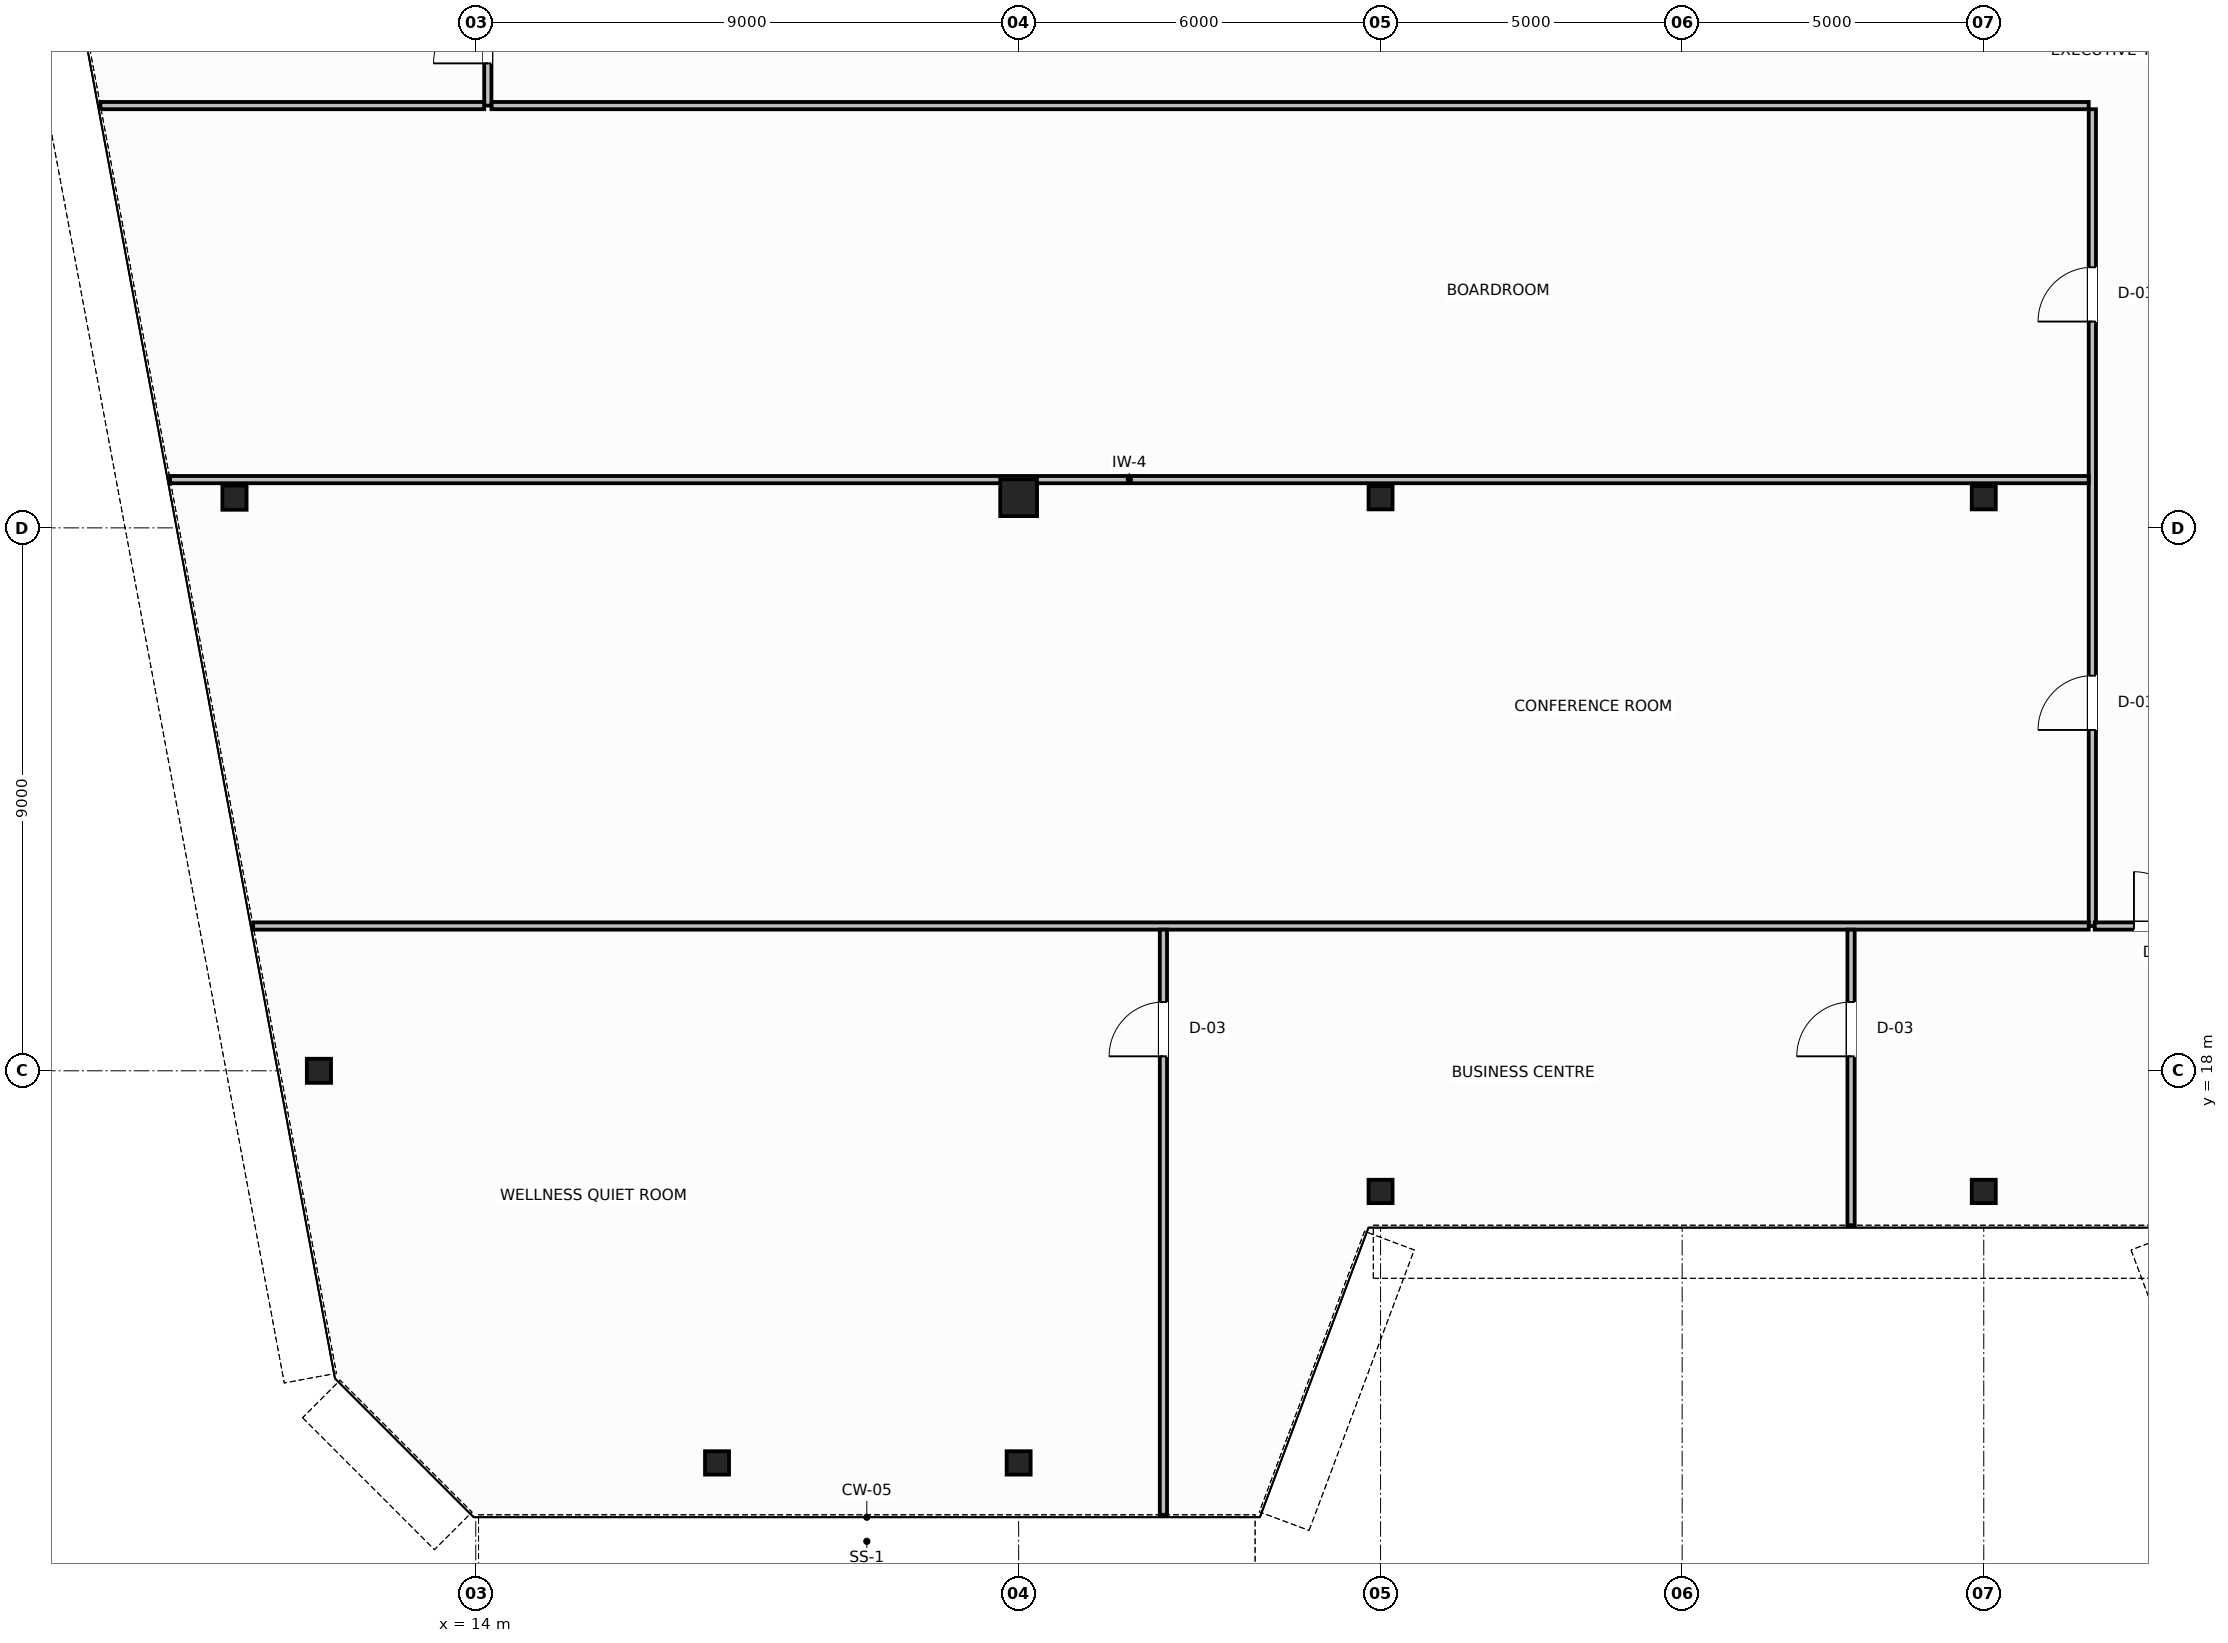
"""IFC4 building model, lengths in metres.
Left out: names, types, materials, properties, quantities, classifications, styles, units other than length and angle.
Written with IfcOpenShell. Run it as: python <this file> out.ifc"""

import sys

from ifc_helpers import new_model, si_unit, direction, frame, frame_2d, origin, origin_2d, place, context, subcontext, project, spatial, rectangle, hollow_circle, i_section, extrude, source, transform, mapped, element, fill, save


model = new_model("IFC4")
c1 = context("Model", 3, precision=1e-05, world=origin(), true_north=direction((0.0, 1.0)))
c2 = subcontext(c1, "Body", "Model", "MODEL_VIEW")
j1 = project(units=[si_unit("LENGTHUNIT", "METRE"), si_unit("PLANEANGLEUNIT", "RADIAN")], contexts=[c1])
p1 = place(None, origin())
s1 = spatial("IfcSite", under=j1, at=p1, CompositionType="ELEMENT")
p2 = place(p1, origin())
s2 = spatial("IfcBuilding", under=s1, at=p2, CompositionType="ELEMENT")
p3 = place(p2, frame((0.0, 0.0, 253.6)))
s3 = spatial("IfcBuildingStorey", under=s2, at=p3, CompositionType="ELEMENT", Elevation=253.6)
m1 = source(origin(), c2, "Body", "SweptSolid", [
    extrude(i_section(OverallWidth=0.401, OverallDepth=0.399, WebThickness=0.025, FlangeThickness=0.035, FilletRadius=0.015, at=origin_2d()), origin(), (0.0, 0.0, 1.0), 3.8),
])
for number, where, z_axis, x_axis in (
    (1, (10.0, 27.5, 0.0), (0.0, 0.0, 1.0), (1.0, 0.0, 0.0)),
    (2, (11.4, 18.0, 0.0), (0.0, 0.0, 1.0), (1.0, 0.0, 0.0)),
):
    element("IfcColumn", number, at=place(p3, frame(where, z_axis=z_axis, x_axis=x_axis)), inside=s3, PredefinedType="COLUMN", context=c2, shape_type="MappedRepresentation", body=[
        mapped(m1, transform((0.0, 0.0, 0.0), scale=1.0)),
    ])
m2 = source(origin(), c2, "Body", "SweptSolid", [
    extrude(hollow_circle(Radius=0.305, WallThickness=0.03, at=origin_2d()), origin(), (0.0, 0.0, 1.0), 3.8),
])
p4 = place(p3, frame((23.0, 27.5, 0.0), z_axis=(0.0, 0.0, 1.0), x_axis=(1.0, 0.0, 0.0)))
e3 = element("IfcColumn", 3, at=p4, inside=s3, PredefinedType="COLUMN", context=c2, shape_type="MappedRepresentation", body=[
    mapped(m2, transform((0.0, 0.0, 0.0), scale=1.0)),
])
m3 = source(origin(), c2, "Body", "SweptSolid", [
    extrude(i_section(OverallWidth=0.398, OverallDepth=0.387, WebThickness=0.021, FlangeThickness=0.029, FilletRadius=0.015, at=origin_2d()), origin(), (0.0, 0.0, 1.0), 3.8),
])
for number, where, z_axis, x_axis in (
    (4, (29.0, 27.5, 0.0), (0.0, 0.0, 1.0), (1.0, 0.0, 0.0)),
    (5, (39.0, 27.5, 0.0), (0.0, 0.0, 1.0), (1.0, 0.0, 0.0)),
    (6, (18.0, 11.5, 0.0), (0.0, 0.0, 1.0), (1.0, 0.0, 0.0)),
    (7, (23.0, 11.5, 0.0), (0.0, 0.0, 1.0), (1.0, 0.0, 0.0)),
    (8, (29.0, 16.0, 0.0), (0.0, 0.0, 1.0), (1.0, 0.0, 0.0)),
    (9, (39.0, 16.0, 0.0), (0.0, 0.0, 1.0), (1.0, 0.0, 0.0)),
):
    element("IfcColumn", number, at=place(p3, frame(where, z_axis=z_axis, x_axis=x_axis)), inside=s3, PredefinedType="COLUMN", context=c2, shape_type="MappedRepresentation", body=[
        mapped(m3, transform((0.0, 0.0, 0.0), scale=1.0)),
    ])
p5 = place(p3, frame((14.26, 34.0, 0.0), z_axis=(0.0, 0.0, 1.0), x_axis=(1.0, 0.0, 0.0)))
e10 = element("IfcWall", 10, at=p5, inside=s3, PredefinedType="PARTITIONING", context=c2, shape_type="SweptSolid", body=[
    extrude(rectangle(XDim=26.48, YDim=0.12, at=frame_2d((13.24, 0.0))), origin(), (0.0, 0.0, 1.0), 3.58),
])
p6 = place(p3, frame((14.2, 34.0, 0.0), z_axis=(0.0, 0.0, 1.0), x_axis=(0.0, 1.0, 0.0)))
e11 = element("IfcWall", 11, at=p6, inside=s3, PredefinedType="PARTITIONING", context=c2, shape_type="SweptSolid", body=[
    extrude(rectangle(XDim=2.44, YDim=0.12, at=frame_2d((1.22, 0.0))), origin(), (0.0, 0.0, 1.0), 3.58),
])
p7 = place(p6, frame((0.7, 0.0, 0.0)))
e12 = element("IfcOpeningElement", 12, at=p7, cuts=e11, PredefinedType="OPENING", context=c2, shape_type="SweptSolid", body=[
    extrude(rectangle(XDim=0.9, YDim=2.15, at=frame_2d((0.45, 1.075))), frame((0.0, 0.07, 0.0), z_axis=(0.0, -1.0, 0.0), x_axis=(1.0, 0.0, 0.0)), (0.0, 0.0, 1.0), 0.14),
])
p8 = place(p3, frame((40.8, 20.4, 0.0), z_axis=(0.0, 0.0, 1.0), x_axis=(0.0, 1.0, 0.0)))
e13 = element("IfcWall", 13, at=p8, inside=s3, PredefinedType="PARTITIONING", context=c2, shape_type="SweptSolid", body=[
    extrude(rectangle(XDim=13.54, YDim=0.12, at=frame_2d((6.77, 0.0))), origin(), (0.0, 0.0, 1.0), 3.58),
])
p9 = place(p8, frame((3.25, 0.0, 0.0)))
e14 = element("IfcOpeningElement", 14, at=p9, cuts=e13, PredefinedType="OPENING", context=c2, shape_type="SweptSolid", body=[
    extrude(rectangle(XDim=0.9, YDim=2.15, at=frame_2d((0.45, 1.075))), frame((0.0, 0.07, 0.0), z_axis=(0.0, -1.0, 0.0), x_axis=(1.0, 0.0, 0.0)), (0.0, 0.0, 1.0), 0.14),
])
p10 = place(p8, frame((10.02, 0.0, 0.0)))
e15 = element("IfcOpeningElement", 15, at=p10, cuts=e13, PredefinedType="OPENING", context=c2, shape_type="SweptSolid", body=[
    extrude(rectangle(XDim=0.9, YDim=2.15, at=frame_2d((0.45, 1.075))), frame((0.0, 0.07, 0.0), z_axis=(0.0, -1.0, 0.0), x_axis=(1.0, 0.0, 0.0)), (0.0, 0.0, 1.0), 0.14),
])
p11 = place(p3, frame((40.84, 20.4, 0.0), z_axis=(0.0, 0.0, 1.0), x_axis=(1.0, 0.0, 0.0)))
e16 = element("IfcWall", 16, at=p11, inside=s3, PredefinedType="PARTITIONING", context=c2, shape_type="SweptSolid", body=[
    extrude(rectangle(XDim=2.32, YDim=0.12, at=frame_2d((1.16, 0.0))), origin(), (0.0, 0.0, 1.0), 3.58),
])
p12 = place(p11, frame((0.65, 0.0, 0.0)))
e17 = element("IfcOpeningElement", 17, at=p12, cuts=e16, PredefinedType="OPENING", context=c2, shape_type="SweptSolid", body=[
    extrude(rectangle(XDim=0.9, YDim=2.15, at=frame_2d((0.45, 1.075))), frame((0.0, 0.07, 0.0), z_axis=(0.0, -1.0, 0.0), x_axis=(1.0, 0.0, 0.0)), (0.0, 0.0, 1.0), 0.14),
])
p13 = place(p3, frame((7.777, 34.0, 0.0), z_axis=(0.0, 0.0, 1.0), x_axis=(1.0, 0.0, 0.0)))
e18 = element("IfcWall", 18, at=p13, inside=s3, PredefinedType="PARTITIONING", context=c2, shape_type="SweptSolid", body=[
    extrude(rectangle(XDim=6.363, YDim=0.12, at=frame_2d((3.181, 0.0))), origin(), (0.0, 0.0, 1.0), 3.58),
])
p14 = place(p3, frame((8.932, 27.8, 0.0), z_axis=(0.0, 0.0, 1.0), x_axis=(1.0, 0.0, 0.0)))
e19 = element("IfcWall", 19, at=p14, inside=s3, PredefinedType="PARTITIONING", context=c2, shape_type="SweptSolid", body=[
    extrude(rectangle(XDim=31.808, YDim=0.12, at=frame_2d((15.904, 0.0))), origin(), (0.0, 0.0, 1.0), 3.58),
])
p15 = place(p3, frame((10.31, 20.4, 0.0), z_axis=(0.0, 0.0, 1.0), x_axis=(1.0, 0.0, 0.0)))
e20 = element("IfcWall", 20, at=p15, inside=s3, PredefinedType="PARTITIONING", context=c2, shape_type="SweptSolid", body=[
    extrude(rectangle(XDim=30.43, YDim=0.12, at=frame_2d((15.215, 0.0))), origin(), (0.0, 0.0, 1.0), 3.58),
])
p16 = place(p3, frame((25.4, 10.64, 0.0), z_axis=(0.0, 0.0, 1.0), x_axis=(0.0, 1.0, 0.0)))
e21 = element("IfcWall", 21, at=p16, inside=s3, PredefinedType="PARTITIONING", context=c2, shape_type="SweptSolid", body=[
    extrude(rectangle(XDim=9.7, YDim=0.12, at=frame_2d((4.85, 0.0))), origin(), (0.0, 0.0, 1.0), 3.58),
])
p17 = place(p16, frame((7.6, 0.0, 0.0)))
e22 = element("IfcOpeningElement", 22, at=p17, cuts=e21, PredefinedType="OPENING", context=c2, shape_type="SweptSolid", body=[
    extrude(rectangle(XDim=0.9, YDim=2.15, at=frame_2d((0.45, 1.075))), frame((0.0, 0.07, 0.0), z_axis=(0.0, -1.0, 0.0), x_axis=(1.0, 0.0, 0.0)), (0.0, 0.0, 1.0), 0.14),
])
p18 = place(p3, frame((36.8, 15.44, 0.0), z_axis=(0.0, 0.0, 1.0), x_axis=(0.0, 1.0, 0.0)))
e23 = element("IfcWall", 23, at=p18, inside=s3, PredefinedType="PARTITIONING", context=c2, shape_type="SweptSolid", body=[
    extrude(rectangle(XDim=4.9, YDim=0.12, at=frame_2d((2.45, 0.0))), origin(), (0.0, 0.0, 1.0), 3.58),
])
p19 = place(p18, frame((2.8, 0.0, 0.0)))
e24 = element("IfcOpeningElement", 24, at=p19, cuts=e23, PredefinedType="OPENING", context=c2, shape_type="SweptSolid", body=[
    extrude(rectangle(XDim=0.9, YDim=2.15, at=frame_2d((0.45, 1.075))), frame((0.0, 0.07, 0.0), z_axis=(0.0, -1.0, 0.0), x_axis=(1.0, 0.0, 0.0)), (0.0, 0.0, 1.0), 0.14),
])
m4 = source(origin(), c2, "Body", "SweptSolid", [
    extrude(rectangle(XDim=0.9, YDim=2.15, at=frame_2d((0.45, 1.075))), frame((0.0, 0.025, 0.0), z_axis=(0.0, -1.0, 0.0), x_axis=(1.0, 0.0, 0.0)), (0.0, 0.0, 1.0), 0.05),
])
p20 = place(p7, origin())
e25 = element("IfcDoor", 25, at=p20, inside=s3, OperationType="SINGLE_SWING_LEFT", PredefinedType="DOOR", context=c2, shape_type="MappedRepresentation", body=[
    mapped(m4, transform((0.0, 0.0, 0.0), scale=1.0)),
])
fill(e12, e25)
p21 = place(p9, origin())
e26 = element("IfcDoor", 26, at=p21, inside=s3, OperationType="SINGLE_SWING_LEFT", PredefinedType="DOOR", context=c2, shape_type="MappedRepresentation", body=[
    mapped(m4, transform((0.0, 0.0, 0.0), scale=1.0)),
])
fill(e14, e26)
p22 = place(p10, origin())
e27 = element("IfcDoor", 27, at=p22, inside=s3, OperationType="SINGLE_SWING_RIGHT", PredefinedType="DOOR", context=c2, shape_type="MappedRepresentation", body=[
    mapped(m4, transform((0.0, 0.0, 0.0), scale=1.0)),
])
fill(e15, e27)
p23 = place(p17, origin())
e28 = element("IfcDoor", 28, at=p23, inside=s3, OperationType="SINGLE_SWING_RIGHT", PredefinedType="DOOR", context=c2, shape_type="MappedRepresentation", body=[
    mapped(m4, transform((0.0, 0.0, 0.0), scale=1.0)),
])
fill(e22, e28)
p24 = place(p19, origin())
e29 = element("IfcDoor", 29, at=p24, inside=s3, OperationType="SINGLE_SWING_LEFT", PredefinedType="DOOR", context=c2, shape_type="MappedRepresentation", body=[
    mapped(m4, transform((0.0, 0.0, 0.0), scale=1.0)),
])
fill(e24, e29)
p25 = place(p12, origin())
e30 = element("IfcDoor", 30, at=p25, inside=s3, OperationType="SINGLE_SWING_LEFT", PredefinedType="DOOR", context=c2, shape_type="MappedRepresentation", body=[
    mapped(m4, transform((0.0, 0.0, 0.0), scale=1.0)),
])
fill(e17, e30)
save(model, sys.argv[1])
